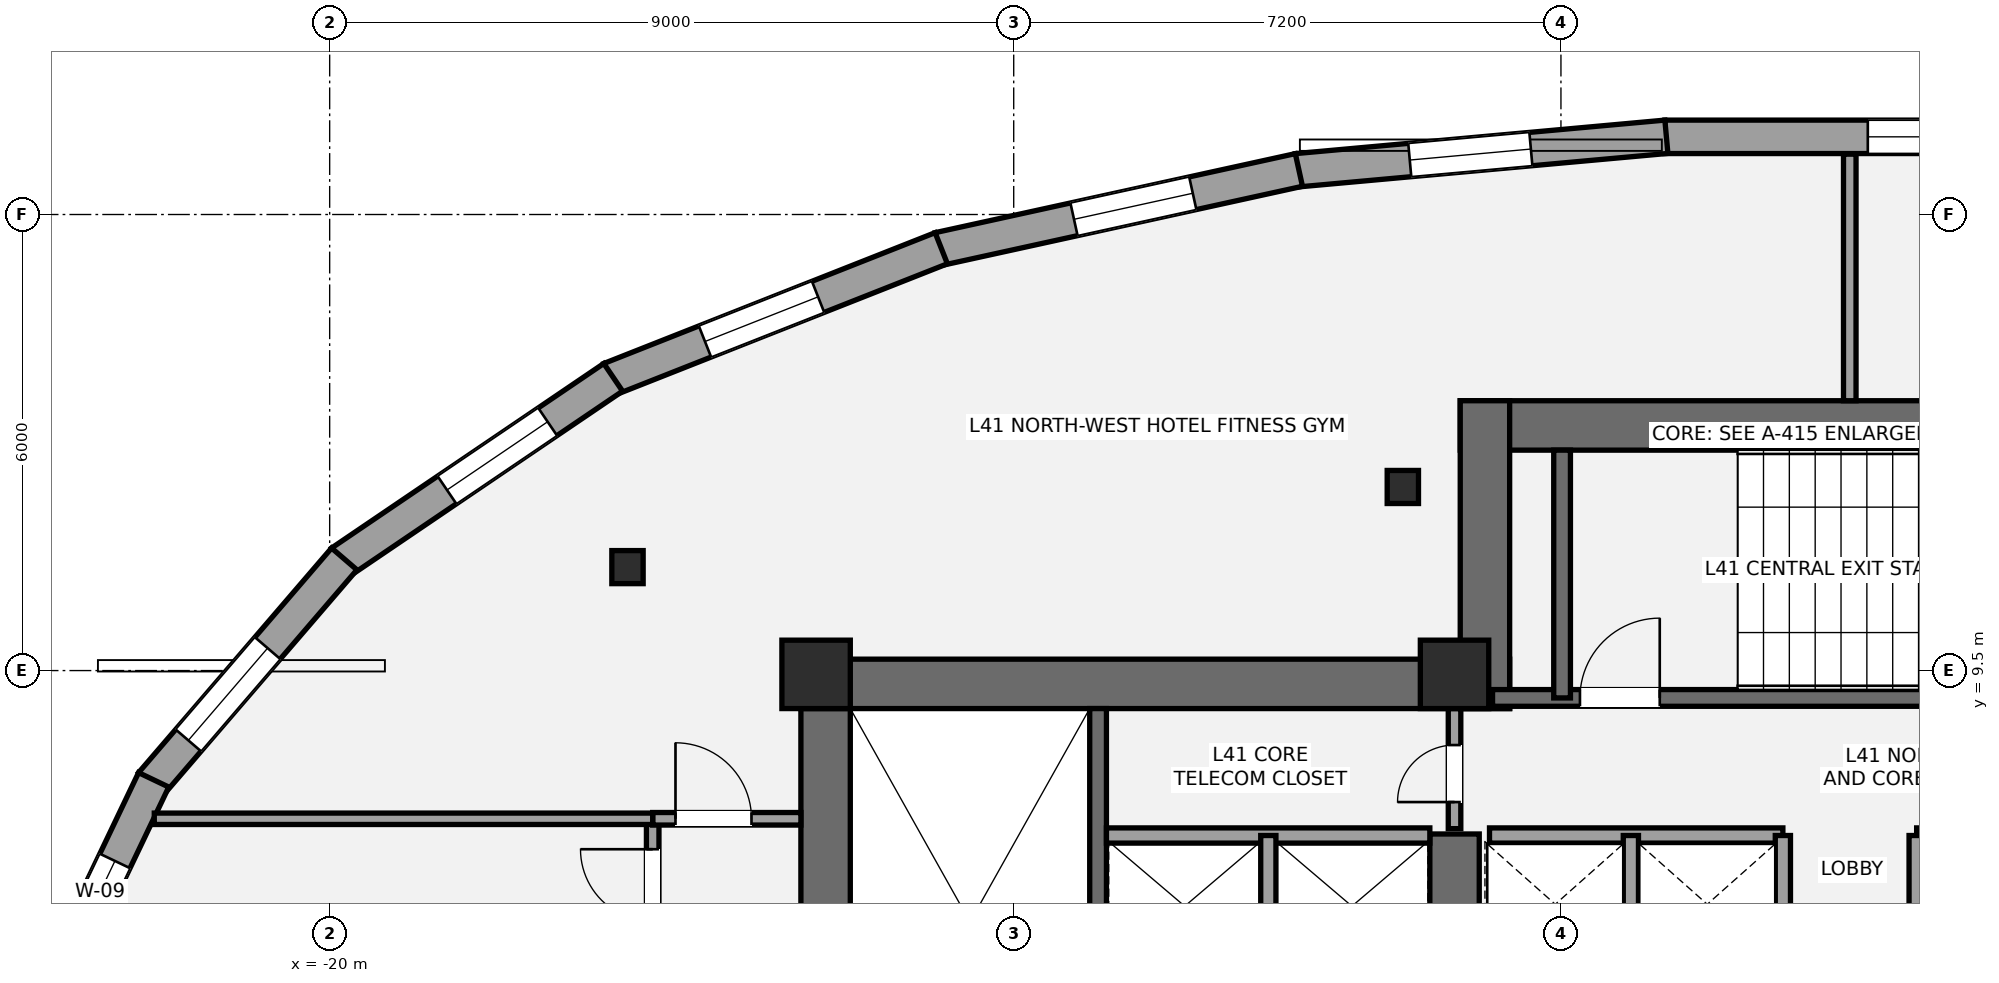
"""IFC4 building model, lengths in metres.
Left out: names, types, materials, properties, quantities, classifications, styles, units other than length and angle.
Written with IfcOpenShell. Run it as: python <this file> out.ifc"""

import sys

from ifc_helpers import new_model, si_unit, direction, frame, frame_2d, origin, origin_2d, place, context, subcontext, project, spatial, rectangle, i_section, extrude, element, fill, save


model = new_model("IFC4")
c1 = context("Model", 3, precision=1e-05, world=origin(), true_north=direction((0.0, 1.0)))
c2 = subcontext(c1, "Body", "Model", "MODEL_VIEW")
j1 = project(units=[si_unit("LENGTHUNIT", "METRE"), si_unit("PLANEANGLEUNIT", "RADIAN")], contexts=[c1])
p1 = place(None, origin())
s1 = spatial("IfcSite", under=j1, at=p1, CompositionType="ELEMENT")
p2 = place(p1, origin())
s2 = spatial("IfcBuilding", under=s1, at=p2, CompositionType="ELEMENT")
p3 = place(p2, frame((0.0, 0.0, 153.4)))
s3 = spatial("IfcBuildingStorey", under=s2, at=p3, CompositionType="ELEMENT", Elevation=153.4)
p4 = place(p3, frame((-13.475, 1.2, 0.0), z_axis=(0.0, 0.0, 1.0), x_axis=(0.0, 1.0, 0.0)))
e1 = element("IfcWall", 1, at=p4, inside=s3, PredefinedType="SHEAR", context=c2, shape_type="SweptSolid", body=[
    extrude(rectangle(XDim=8.45, YDim=0.65, at=frame_2d((4.225, 0.0))), origin(), (0.0, 0.0, 1.0), 3.2),
])
p5 = place(p3, frame((-13.8, 9.325, 0.0), z_axis=(0.0, 0.0, 1.0), x_axis=(1.0, 0.0, 0.0)))
e2 = element("IfcWall", 2, at=p5, inside=s3, PredefinedType="SHEAR", context=c2, shape_type="SweptSolid", body=[
    extrude(rectangle(XDim=9.325, YDim=0.65, at=frame_2d((4.663, 0.0))), origin(), (0.0, 0.0, 1.0), 3.2),
])
p6 = place(p3, frame((-5.2, 5.35, 0.0), z_axis=(0.0, 0.0, 1.0), x_axis=(0.0, 1.0, 0.0)))
e3 = element("IfcWall", 3, at=p6, inside=s3, PredefinedType="SHEAR", context=c2, shape_type="SweptSolid", body=[
    extrude(rectangle(XDim=2.0, YDim=0.65, at=frame_2d((1.0, 0.0))), origin(), (0.0, 0.0, 1.0), 3.2),
])
p7 = place(p3, frame((-9.89, 1.85, 0.0), z_axis=(0.0, 0.0, 1.0), x_axis=(0.0, 1.0, 0.0)))
e4 = element("IfcWall", 4, at=p7, inside=s3, PredefinedType="SHEAR", context=c2, shape_type="SweptSolid", body=[
    extrude(rectangle(XDim=7.15, YDim=0.22, at=frame_2d((3.575, 0.0))), origin(), (0.0, 0.0, 1.0), 3.2),
])
p8 = place(p3, frame((-5.125, 12.725, 0.0), z_axis=(0.0, 0.0, 1.0), x_axis=(1.0, 0.0, 0.0)))
e5 = element("IfcWall", 5, at=p8, inside=s3, PredefinedType="SHEAR", context=c2, shape_type="SweptSolid", body=[
    extrude(rectangle(XDim=10.25, YDim=0.65, at=frame_2d((5.125, 0.0))), origin(), (0.0, 0.0, 1.0), 3.2),
])
p9 = place(p3, frame((-4.8, 9.0, 0.0), z_axis=(0.0, 0.0, 1.0), x_axis=(0.0, 1.0, 0.0)))
e6 = element("IfcWall", 6, at=p9, inside=s3, PredefinedType="SHEAR", context=c2, shape_type="SweptSolid", body=[
    extrude(rectangle(XDim=4.05, YDim=0.65, at=frame_2d((2.025, 0.0))), origin(), (0.0, 0.0, 1.0), 3.2),
])
p10 = place(p3, frame((-4.7, 9.14, 0.0), z_axis=(0.0, 0.0, 1.0), x_axis=(1.0, 0.0, 0.0)))
e7 = element("IfcWall", 7, at=p10, inside=s3, PredefinedType="SHEAR", context=c2, shape_type="SweptSolid", body=[
    extrude(rectangle(XDim=9.3, YDim=0.22, at=frame_2d((4.65, 0.0))), origin(), (0.0, 0.0, 1.0), 3.2),
])
p11 = place(p10, frame((1.15, 0.0, 0.0)))
e8 = element("IfcOpeningElement", 8, at=p11, cuts=e7, PredefinedType="OPENING", context=c2, shape_type="SweptSolid", body=[
    extrude(rectangle(XDim=1.05, YDim=2.15, at=frame_2d((0.525, 1.075))), frame((0.0, 0.12, 0.0), z_axis=(0.0, -1.0, 0.0), x_axis=(1.0, 0.0, 0.0)), (0.0, 0.0, 1.0), 0.24),
])
p12 = place(p3, frame((-3.785, 9.14, 0.0), z_axis=(0.0, 0.0, 1.0), x_axis=(0.0, 1.0, 0.0)))
e9 = element("IfcWall", 9, at=p12, inside=s3, PredefinedType="SHEAR", context=c2, shape_type="SweptSolid", body=[
    extrude(rectangle(XDim=3.26, YDim=0.22, at=frame_2d((1.63, 0.0))), origin(), (0.0, 0.0, 1.0), 3.2),
])
for number, where, z_axis, x_axis in (
    (10, (-13.6, 9.45, 0.0), (0.0, 0.0, 1.0), (1.0, 0.0, 0.0)),
    (11, (-5.2, 9.45, 0.0), (0.0, 0.0, 1.0), (1.0, 0.0, 0.0)),
):
    element("IfcColumn", number, at=place(p3, frame(where, z_axis=z_axis, x_axis=x_axis)), inside=s3, PredefinedType="COLUMN", context=c2, shape_type="SweptSolid", body=[
        extrude(rectangle(XDim=0.9, YDim=0.9, at=origin_2d()), origin(), (0.0, 0.0, 1.0), 3.2),
    ])
for number, where, z_axis, x_axis in (
    (12, (-5.88, 11.915, 0.0), (0.0, 0.0, 1.0), (1.0, 0.0, 0.0)),
    (13, (-16.082, 10.861, 0.0), (0.0, 0.0, 1.0), (1.0, 0.0, 0.0)),
):
    element("IfcColumn", number, at=place(p3, frame(where, z_axis=z_axis, x_axis=x_axis)), inside=s3, PredefinedType="COLUMN", context=c2, shape_type="SweptSolid", body=[
        extrude(i_section(OverallWidth=0.412, OverallDepth=0.435, WebThickness=0.036, FlangeThickness=0.057, at=origin_2d()), origin(), (0.0, 0.0, 1.0), 3.2),
    ])
p13 = place(p3, frame((-2.433, 16.522, 0.0), z_axis=(0.0, 0.0, 1.0), x_axis=(1.0, 0.0, 0.0)))
e14 = element("IfcWall", 14, at=p13, inside=s3, PredefinedType="STANDARD", context=c2, shape_type="SweptSolid", body=[
    extrude(rectangle(XDim=4.865, YDim=0.44, at=frame_2d((2.433, 0.0))), origin(), (0.0, 0.0, 1.0), 2.315),
])
p14 = place(p13, frame((2.67, 0.0, 0.58)))
e15 = element("IfcOpeningElement", 15, at=p14, cuts=e14, PredefinedType="OPENING", context=c2, shape_type="SweptSolid", body=[
    extrude(rectangle(XDim=1.6, YDim=1.55, at=frame_2d((0.8, 0.775))), frame((0.0, 0.23, 0.0), z_axis=(0.0, -1.0, 0.0), x_axis=(1.0, 0.0, 0.0)), (0.0, 0.0, 1.0), 0.46),
])
p15 = place(p3, frame((-7.275, 16.082, 0.0), z_axis=(0.0, 0.0, 1.0), x_axis=(0.995913675095, 0.090310308155, 0.0)))
e16 = element("IfcWall", 16, at=p15, inside=s3, PredefinedType="STANDARD", context=c2, shape_type="SweptSolid", body=[
    extrude(rectangle(XDim=4.882, YDim=0.44, at=frame_2d((2.441, 0.0))), origin(), (0.0, 0.0, 1.0), 2.315),
])
p16 = place(p15, frame((1.492, 0.0, 0.58)))
e17 = element("IfcOpeningElement", 17, at=p16, cuts=e16, PredefinedType="OPENING", context=c2, shape_type="SweptSolid", body=[
    extrude(rectangle(XDim=1.6, YDim=1.55, at=frame_2d((0.8, 0.775))), frame((0.0, 0.23, 0.0), z_axis=(0.0, -1.0, 0.0), x_axis=(1.0, 0.0, 0.0)), (0.0, 0.0, 1.0), 0.46),
])
p17 = place(p3, frame((-11.987, 15.046, 0.0), z_axis=(0.0, 0.0, 1.0), x_axis=(0.976767211892, 0.214303088576, 0.0)))
e18 = element("IfcWall", 18, at=p17, inside=s3, PredefinedType="STANDARD", context=c2, shape_type="SweptSolid", body=[
    extrude(rectangle(XDim=4.852, YDim=0.44, at=frame_2d((2.426, 0.0))), origin(), (0.0, 0.0, 1.0), 2.315),
])
p18 = place(p17, frame((1.823, 0.0, 0.58)))
e19 = element("IfcOpeningElement", 19, at=p18, cuts=e18, PredefinedType="OPENING", context=c2, shape_type="SweptSolid", body=[
    extrude(rectangle(XDim=1.6, YDim=1.55, at=frame_2d((0.8, 0.775))), frame((0.0, 0.23, 0.0), z_axis=(0.0, -1.0, 0.0), x_axis=(1.0, 0.0, 0.0)), (0.0, 0.0, 1.0), 0.46),
])
p19 = place(p3, frame((-16.312, 13.335, 0.0), z_axis=(0.0, 0.0, 1.0), x_axis=(0.930130872211, 0.367228213186, 0.0)))
e20 = element("IfcWall", 20, at=p19, inside=s3, PredefinedType="STANDARD", context=c2, shape_type="SweptSolid", body=[
    extrude(rectangle(XDim=4.686, YDim=0.44, at=frame_2d((2.343, 0.0))), origin(), (0.0, 0.0, 1.0), 2.315),
])
p20 = place(p19, frame((1.344, 0.0, 0.58)))
e21 = element("IfcOpeningElement", 21, at=p20, cuts=e20, PredefinedType="OPENING", context=c2, shape_type="SweptSolid", body=[
    extrude(rectangle(XDim=1.6, YDim=1.55, at=frame_2d((0.8, 0.775))), frame((0.0, 0.23, 0.0), z_axis=(0.0, -1.0, 0.0), x_axis=(1.0, 0.0, 0.0)), (0.0, 0.0, 1.0), 0.46),
])
p21 = place(p3, frame((-19.852, 10.93, 0.0), z_axis=(0.0, 0.0, 1.0), x_axis=(0.827746250701, 0.561102614902, 0.0)))
e22 = element("IfcWall", 22, at=p21, inside=s3, PredefinedType="STANDARD", context=c2, shape_type="SweptSolid", body=[
    extrude(rectangle(XDim=4.327, YDim=0.44, at=frame_2d((2.164, 0.0))), origin(), (0.0, 0.0, 1.0), 2.315),
])
p22 = place(p21, frame((1.686, 0.0, 0.58)))
e23 = element("IfcOpeningElement", 23, at=p22, cuts=e22, PredefinedType="OPENING", context=c2, shape_type="SweptSolid", body=[
    extrude(rectangle(XDim=1.6, YDim=1.55, at=frame_2d((0.8, 0.775))), frame((0.0, 0.23, 0.0), z_axis=(0.0, -1.0, 0.0), x_axis=(1.0, 0.0, 0.0)), (0.0, 0.0, 1.0), 0.46),
])
p23 = place(p3, frame((-22.347, 8.014, 0.0), z_axis=(0.0, 0.0, 1.0), x_axis=(0.651797156524, 0.758393345664, 0.0)))
e24 = element("IfcWall", 24, at=p23, inside=s3, PredefinedType="STANDARD", context=c2, shape_type="SweptSolid", body=[
    extrude(rectangle(XDim=3.896, YDim=0.44, at=frame_2d((1.948, 0.0))), origin(), (0.0, 0.0, 1.0), 2.315),
])
p24 = place(p23, frame((0.749, 0.0, 0.58)))
e25 = element("IfcOpeningElement", 25, at=p24, cuts=e24, PredefinedType="OPENING", context=c2, shape_type="SweptSolid", body=[
    extrude(rectangle(XDim=1.6, YDim=1.55, at=frame_2d((0.8, 0.775))), frame((0.0, 0.23, 0.0), z_axis=(0.0, -1.0, 0.0), x_axis=(1.0, 0.0, 0.0)), (0.0, 0.0, 1.0), 0.46),
])
p25 = place(p3, frame((-23.85, 4.85, 0.0), z_axis=(0.0, 0.0, 1.0), x_axis=(0.430899691529, 0.902399831472, 0.0)))
e26 = element("IfcWall", 26, at=p25, inside=s3, PredefinedType="STANDARD", context=c2, shape_type="SweptSolid", body=[
    extrude(rectangle(XDim=3.56, YDim=0.44, at=frame_2d((1.78, 0.0))), origin(), (0.0, 0.0, 1.0), 2.315),
])
p26 = place(p25, frame((1.477, 0.0, 0.58)))
e27 = element("IfcOpeningElement", 27, at=p26, cuts=e26, PredefinedType="OPENING", context=c2, shape_type="SweptSolid", body=[
    extrude(rectangle(XDim=0.9, YDim=1.35, at=frame_2d((0.45, 0.675))), frame((0.0, 0.23, 0.0), z_axis=(0.0, -1.0, 0.0), x_axis=(1.0, 0.0, 0.0)), (0.0, 0.0, 1.0), 0.46),
])
p27 = place(p3, frame((-9.78, 7.33, 0.0), z_axis=(0.0, 0.0, 1.0), x_axis=(1.0, 0.0, 0.0)))
e28 = element("IfcWall", 28, at=p27, inside=s3, PredefinedType="SOLIDWALL", context=c2, shape_type="SweptSolid", body=[
    extrude(rectangle(XDim=4.255, YDim=0.2, at=frame_2d((2.127, 0.0))), origin(), (0.0, 0.0, 1.0), 3.02),
])
p28 = place(p3, frame((-7.65, 5.47, 0.0), z_axis=(0.0, 0.0, 1.0), x_axis=(0.0, 1.0, 0.0)))
e29 = element("IfcWall", 29, at=p28, inside=s3, PredefinedType="SOLIDWALL", context=c2, shape_type="SweptSolid", body=[
    extrude(rectangle(XDim=1.86, YDim=0.2, at=frame_2d((0.93, 0.0))), origin(), (0.0, 0.0, 1.0), 3.02),
])
for number, where, z_axis, x_axis in (
    (30, (-4.74, 7.33, 0.0), (0.0, 0.0, 1.0), (1.0, 0.0, 0.0)),
    (31, (0.88, 7.33, 0.0), (0.0, 0.0, 1.0), (1.0, 0.0, 0.0)),
):
    element("IfcWall", number, at=place(p3, frame(where, z_axis=z_axis, x_axis=x_axis)), inside=s3, PredefinedType="SOLIDWALL", context=c2, shape_type="SweptSolid", body=[
        extrude(rectangle(XDim=3.86, YDim=0.2, at=frame_2d((1.93, 0.0))), origin(), (0.0, 0.0, 1.0), 3.02),
    ])
p29 = place(p3, frame((-2.88, 5.52, 0.0), z_axis=(0.0, 0.0, 1.0), x_axis=(0.0, 1.0, 0.0)))
e32 = element("IfcWall", 32, at=p29, inside=s3, PredefinedType="SOLIDWALL", context=c2, shape_type="SweptSolid", body=[
    extrude(rectangle(XDim=1.81, YDim=0.2, at=frame_2d((0.905, 0.0))), origin(), (0.0, 0.0, 1.0), 3.02),
])
p30 = place(p3, frame((-0.88, 5.52, 0.0), z_axis=(0.0, 0.0, 1.0), x_axis=(0.0, 1.0, 0.0)))
e33 = element("IfcWall", 33, at=p30, inside=s3, PredefinedType="SOLIDWALL", context=c2, shape_type="SweptSolid", body=[
    extrude(rectangle(XDim=1.81, YDim=0.2, at=frame_2d((0.905, 0.0))), origin(), (0.0, 0.0, 1.0), 2.473),
])
p31 = place(p3, frame((0.88, 5.52, 0.0), z_axis=(0.0, 0.0, 1.0), x_axis=(0.0, 1.0, 0.0)))
e34 = element("IfcWall", 34, at=p31, inside=s3, PredefinedType="SOLIDWALL", context=c2, shape_type="SweptSolid", body=[
    extrude(rectangle(XDim=1.81, YDim=0.2, at=frame_2d((0.905, 0.0))), origin(), (0.0, 0.0, 1.0), 3.02),
])
p32 = place(p3, frame((-5.2, 7.42, 0.0), z_axis=(0.0, 0.0, 1.0), x_axis=(0.0, 1.0, 0.0)))
e35 = element("IfcWall", 35, at=p32, inside=s3, PredefinedType="PARTITIONING", context=c2, shape_type="SweptSolid", body=[
    extrude(rectangle(XDim=1.58, YDim=0.165, at=frame_2d((0.79, 0.0))), origin(), (0.0, 0.0, 1.0), 3.02),
])
p33 = place(p32, frame((0.35, 0.0, 0.0)))
e36 = element("IfcOpeningElement", 36, at=p33, cuts=e35, PredefinedType="OPENING", context=c2, shape_type="SweptSolid", body=[
    extrude(rectangle(XDim=0.75, YDim=2.1, at=frame_2d((0.375, 1.05))), frame((0.0, 0.093, 0.0), z_axis=(0.0, -1.0, 0.0), x_axis=(1.0, 0.0, 0.0)), (0.0, 0.0, 1.0), 0.185),
])
p34 = place(p3, frame((-15.75, -13.312, 0.0), z_axis=(0.0, 0.0, 1.0), x_axis=(0.0, 1.0, 0.0)))
e37 = element("IfcWall", 37, at=p34, inside=s3, PredefinedType="PARTITIONING", context=c2, shape_type="SweptSolid", body=[
    extrude(rectangle(XDim=20.862, YDim=0.165, at=frame_2d((10.431, 0.0))), origin(), (0.0, 0.0, 1.0), 2.473),
])
p35 = place(p34, frame((5.762, 0.0, 0.0)))
e38 = element("IfcOpeningElement", 38, at=p35, cuts=e37, PredefinedType="OPENING", context=c2, shape_type="SweptSolid", body=[
    extrude(rectangle(XDim=0.85, YDim=2.1, at=frame_2d((0.425, 1.05))), frame((0.0, 0.093, 0.0), z_axis=(0.0, -1.0, 0.0), x_axis=(1.0, 0.0, 0.0)), (0.0, 0.0, 1.0), 0.185),
])
p36 = place(p34, frame((10.162, 0.0, 0.0)))
e39 = element("IfcOpeningElement", 39, at=p36, cuts=e37, PredefinedType="OPENING", context=c2, shape_type="SweptSolid", body=[
    extrude(rectangle(XDim=0.95, YDim=2.15, at=frame_2d((0.475, 1.075))), frame((0.0, 0.093, 0.0), z_axis=(0.0, -1.0, 0.0), x_axis=(1.0, 0.0, 0.0)), (0.0, 0.0, 1.0), 0.185),
])
p37 = place(p34, frame((14.762, 0.0, 0.0)))
e40 = element("IfcOpeningElement", 40, at=p37, cuts=e37, PredefinedType="OPENING", context=c2, shape_type="SweptSolid", body=[
    extrude(rectangle(XDim=0.95, YDim=2.15, at=frame_2d((0.475, 1.075))), frame((0.0, 0.093, 0.0), z_axis=(0.0, -1.0, 0.0), x_axis=(1.0, 0.0, 0.0)), (0.0, 0.0, 1.0), 0.185),
])
p38 = place(p34, frame((19.512, 0.0, 0.0)))
e41 = element("IfcOpeningElement", 41, at=p38, cuts=e37, PredefinedType="OPENING", context=c2, shape_type="SweptSolid", body=[
    extrude(rectangle(XDim=0.95, YDim=2.15, at=frame_2d((0.475, 1.075))), frame((0.0, 0.093, 0.0), z_axis=(0.0, -1.0, 0.0), x_axis=(1.0, 0.0, 0.0)), (0.0, 0.0, 1.0), 0.185),
])
p39 = place(p3, frame((-15.75, 7.55, 0.0), z_axis=(0.0, 0.0, 1.0), x_axis=(1.0, 0.0, 0.0)))
e42 = element("IfcWall", 42, at=p39, inside=s3, PredefinedType="PARTITIONING", context=c2, shape_type="SweptSolid", body=[
    extrude(rectangle(XDim=1.95, YDim=0.165, at=frame_2d((0.975, 0.0))), origin(), (0.0, 0.0, 1.0), 3.02),
])
p40 = place(p39, frame((0.3, 0.0, 0.0)))
e43 = element("IfcOpeningElement", 43, at=p40, cuts=e42, PredefinedType="OPENING", context=c2, shape_type="SweptSolid", body=[
    extrude(rectangle(XDim=1.0, YDim=2.15, at=frame_2d((0.5, 1.075))), frame((0.0, 0.093, 0.0), z_axis=(0.0, -1.0, 0.0), x_axis=(1.0, 0.0, 0.0)), (0.0, 0.0, 1.0), 0.185),
])
p41 = place(p3, frame((-22.308, 7.55, 0.0), z_axis=(0.0, 0.0, 1.0), x_axis=(1.0, 0.0, 0.0)))
e44 = element("IfcWall", 44, at=p41, inside=s3, PredefinedType="PLUMBINGWALL", context=c2, shape_type="SweptSolid", body=[
    extrude(rectangle(XDim=6.558, YDim=0.15, at=frame_2d((3.279, 0.0))), origin(), (0.0, 0.0, 1.0), 2.473),
])
p42 = place(p3, frame((0.0, 13.05, 0.0), z_axis=(0.0, 0.0, 1.0), x_axis=(0.0, 1.0, 0.0)))
e45 = element("IfcWall", 45, at=p42, inside=s3, PredefinedType="PARTITIONING", context=c2, shape_type="SweptSolid", body=[
    extrude(rectangle(XDim=3.244, YDim=0.165, at=frame_2d((1.622, 0.0))), origin(), (0.0, 0.0, 1.0), 3.02),
])
p43 = place(p14, origin())
e46 = element("IfcWindow", 46, at=p43, inside=s3, PartitioningType="SINGLE_PANEL", PredefinedType="WINDOW", context=c2, shape_type="SweptSolid", body=[
    extrude(rectangle(XDim=1.6, YDim=1.55, at=frame_2d((0.8, 0.775))), frame((0.0, -0.01, 0.0), z_axis=(0.0, -1.0, 0.0), x_axis=(1.0, 0.0, 0.0)), (0.0, 0.0, 1.0), 0.06),
])
fill(e15, e46)
p44 = place(p16, origin())
e47 = element("IfcWindow", 47, at=p44, inside=s3, PartitioningType="SINGLE_PANEL", PredefinedType="WINDOW", context=c2, shape_type="SweptSolid", body=[
    extrude(rectangle(XDim=1.6, YDim=1.55, at=frame_2d((0.8, 0.775))), frame((0.0, -0.01, 0.0), z_axis=(0.0, -1.0, 0.0), x_axis=(1.0, 0.0, 0.0)), (0.0, 0.0, 1.0), 0.06),
])
fill(e17, e47)
p45 = place(p18, origin())
e48 = element("IfcWindow", 48, at=p45, inside=s3, PartitioningType="SINGLE_PANEL", PredefinedType="WINDOW", context=c2, shape_type="SweptSolid", body=[
    extrude(rectangle(XDim=1.6, YDim=1.55, at=frame_2d((0.8, 0.775))), frame((0.0, -0.01, 0.0), z_axis=(0.0, -1.0, 0.0), x_axis=(1.0, 0.0, 0.0)), (0.0, 0.0, 1.0), 0.06),
])
fill(e19, e48)
p46 = place(p20, origin())
e49 = element("IfcWindow", 49, at=p46, inside=s3, PartitioningType="SINGLE_PANEL", PredefinedType="WINDOW", context=c2, shape_type="SweptSolid", body=[
    extrude(rectangle(XDim=1.6, YDim=1.55, at=frame_2d((0.8, 0.775))), frame((0.0, -0.01, 0.0), z_axis=(0.0, -1.0, 0.0), x_axis=(1.0, 0.0, 0.0)), (0.0, 0.0, 1.0), 0.06),
])
fill(e21, e49)
p47 = place(p22, origin())
e50 = element("IfcWindow", 50, at=p47, inside=s3, PartitioningType="SINGLE_PANEL", PredefinedType="WINDOW", context=c2, shape_type="SweptSolid", body=[
    extrude(rectangle(XDim=1.6, YDim=1.55, at=frame_2d((0.8, 0.775))), frame((0.0, -0.01, 0.0), z_axis=(0.0, -1.0, 0.0), x_axis=(1.0, 0.0, 0.0)), (0.0, 0.0, 1.0), 0.06),
])
fill(e23, e50)
p48 = place(p24, origin())
e51 = element("IfcWindow", 51, at=p48, inside=s3, PartitioningType="SINGLE_PANEL", PredefinedType="WINDOW", context=c2, shape_type="SweptSolid", body=[
    extrude(rectangle(XDim=1.6, YDim=1.55, at=frame_2d((0.8, 0.775))), frame((0.0, -0.01, 0.0), z_axis=(0.0, -1.0, 0.0), x_axis=(1.0, 0.0, 0.0)), (0.0, 0.0, 1.0), 0.06),
])
fill(e25, e51)
p49 = place(p26, origin())
e52 = element("IfcWindow", 52, at=p49, inside=s3, PartitioningType="SINGLE_PANEL", PredefinedType="WINDOW", context=c2, shape_type="SweptSolid", body=[
    extrude(rectangle(XDim=0.9, YDim=1.35, at=frame_2d((0.45, 0.675))), frame((0.0, -0.01, 0.0), z_axis=(0.0, -1.0, 0.0), x_axis=(1.0, 0.0, 0.0)), (0.0, 0.0, 1.0), 0.06),
])
fill(e27, e52)
p50 = place(p11, origin())
e53 = element("IfcDoor", 53, at=p50, inside=s3, OperationType="SINGLE_SWING_RIGHT", PredefinedType="DOOR", context=c2, shape_type="SweptSolid", body=[
    extrude(rectangle(XDim=1.05, YDim=2.15, at=frame_2d((0.525, 1.075))), frame((0.0, 0.025, 0.0), z_axis=(0.0, -1.0, 0.0), x_axis=(1.0, 0.0, 0.0)), (0.0, 0.0, 1.0), 0.05),
])
fill(e8, e53)
p51 = place(p33, origin())
e54 = element("IfcDoor", 54, at=p51, inside=s3, OperationType="SINGLE_SWING_LEFT", PredefinedType="DOOR", context=c2, shape_type="SweptSolid", body=[
    extrude(rectangle(XDim=0.75, YDim=2.1, at=frame_2d((0.375, 1.05))), frame((0.0, 0.025, 0.0), z_axis=(0.0, -1.0, 0.0), x_axis=(1.0, 0.0, 0.0)), (0.0, 0.0, 1.0), 0.05),
])
fill(e36, e54)
p52 = place(p40, origin())
e55 = element("IfcDoor", 55, at=p52, inside=s3, OperationType="SINGLE_SWING_LEFT", PredefinedType="DOOR", context=c2, shape_type="SweptSolid", body=[
    extrude(rectangle(XDim=1.0, YDim=2.15, at=frame_2d((0.5, 1.075))), frame((0.0, 0.025, 0.0), z_axis=(0.0, -1.0, 0.0), x_axis=(1.0, 0.0, 0.0)), (0.0, 0.0, 1.0), 0.05),
])
fill(e43, e55)
p53 = place(p38, origin())
e56 = element("IfcDoor", 56, at=p53, inside=s3, OperationType="SINGLE_SWING_RIGHT", PredefinedType="DOOR", context=c2, shape_type="SweptSolid", body=[
    extrude(rectangle(XDim=0.95, YDim=2.15, at=frame_2d((0.475, 1.075))), frame((0.0, 0.025, 0.0), z_axis=(0.0, -1.0, 0.0), x_axis=(1.0, 0.0, 0.0)), (0.0, 0.0, 1.0), 0.05),
])
fill(e41, e56)
save(model, sys.argv[1])
